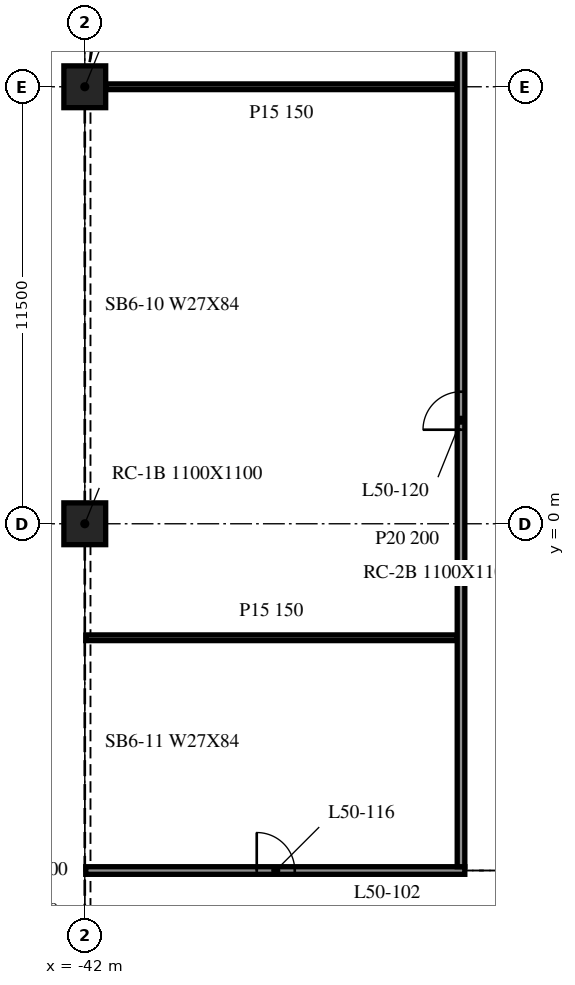
"""IFC4 building model, lengths in metres.
Left out: names, types, materials, properties, quantities, classifications, styles, units other than length and angle.
Written with IfcOpenShell. Run it as: python <this file> out.ifc"""

import sys

from ifc_helpers import new_model, si_unit, direction, frame, frame_2d, origin, origin_2d, place, context, subcontext, project, spatial, rectangle, extrude, element, fill, save


model = new_model("IFC4")
c1 = context("Model", 3, precision=1e-05, world=origin(), true_north=direction((0.0, 1.0)))
c2 = subcontext(c1, "Body", "Model", "MODEL_VIEW")
j1 = project(units=[si_unit("LENGTHUNIT", "METRE"), si_unit("PLANEANGLEUNIT", "RADIAN")], contexts=[c1])
p1 = place(None, origin())
s1 = spatial("IfcSite", under=j1, at=p1, CompositionType="ELEMENT")
p2 = place(p1, origin())
s2 = spatial("IfcBuilding", under=s1, at=p2, CompositionType="ELEMENT")
p3 = place(p2, frame((0.0, 0.0, 209.1)))
s3 = spatial("IfcBuildingStorey", under=s2, at=p3, CompositionType="ELEMENT", Elevation=209.1)
for number, where, z_axis, x_axis in (
    (1, (-42.0, 0.0, -0.34), (0.0, 0.0, 1.0), (1.0, 0.0, 0.0)),
    (2, (-42.0, 11.5, -0.34), (0.0, 0.0, 1.0), (1.0, 0.0, 0.0)),
):
    element("IfcColumn", number, at=place(p3, frame(where, z_axis=z_axis, x_axis=x_axis)), inside=s3, PredefinedType="COLUMN", context=c2, shape_type="SweptSolid", body=[
        extrude(rectangle(XDim=1.1, YDim=1.1, at=origin_2d()), origin(), (0.0, 0.0, 1.0), 3.8),
    ])
p4 = place(p3, frame((-41.975, -9.125, 0.0), z_axis=(0.0, 0.0, 1.0), x_axis=(1.0, 0.0, 0.0)))
e3 = element("IfcWall", 3, at=p4, inside=s3, PredefinedType="PARTITIONING", context=c2, shape_type="SweptSolid", body=[
    extrude(rectangle(XDim=9.975, YDim=0.2, at=frame_2d((4.988, 0.0))), origin(), (0.0, 0.0, 1.0), 3.46),
])
p5 = place(p4, frame((4.5, 0.0, 0.0)))
e4 = element("IfcOpeningElement", 4, at=p5, cuts=e3, PredefinedType="OPENING", context=c2, shape_type="SweptSolid", body=[
    extrude(rectangle(XDim=1.0, YDim=2.1, at=frame_2d((0.5, 1.05))), frame((0.0, 0.11, 0.0), z_axis=(0.0, -1.0, 0.0), x_axis=(1.0, 0.0, 0.0)), (0.0, 0.0, 1.0), 0.22),
])
p6 = place(p3, frame((-41.975, -3.0, 0.0), z_axis=(0.0, 0.0, 1.0), x_axis=(1.0, 0.0, 0.0)))
e5 = element("IfcWall", 5, at=p6, inside=s3, PredefinedType="PARTITIONING", context=c2, shape_type="SweptSolid", body=[
    extrude(rectangle(XDim=9.775, YDim=0.15, at=frame_2d((4.888, 0.0))), origin(), (0.0, 0.0, 1.0), 3.46),
])
p7 = place(p3, frame((-41.45, 11.5, 0.0), z_axis=(0.0, 0.0, 1.0), x_axis=(1.0, 0.0, 0.0)))
e6 = element("IfcWall", 6, at=p7, inside=s3, PredefinedType="PARTITIONING", context=c2, shape_type="SweptSolid", body=[
    extrude(rectangle(XDim=9.25, YDim=0.15, at=frame_2d((4.625, 0.0))), origin(), (0.0, 0.0, 1.0), 3.46),
])
p8 = place(p3, frame((-32.1, -9.025, 0.0), z_axis=(0.0, 0.0, 1.0), x_axis=(0.0, 1.0, 0.0)))
e7 = element("IfcWall", 7, at=p8, inside=s3, PredefinedType="PARTITIONING", context=c2, shape_type="SweptSolid", body=[
    extrude(rectangle(XDim=24.05, YDim=0.2, at=frame_2d((12.025, 0.0))), origin(), (0.0, 0.0, 1.0), 3.46),
])
p9 = place(p8, frame((11.5, 0.0, 0.0)))
e8 = element("IfcOpeningElement", 8, at=p9, cuts=e7, PredefinedType="OPENING", context=c2, shape_type="SweptSolid", body=[
    extrude(rectangle(XDim=1.0, YDim=2.1, at=frame_2d((0.5, 1.05))), frame((0.0, 0.11, 0.0), z_axis=(0.0, -1.0, 0.0), x_axis=(1.0, 0.0, 0.0)), (0.0, 0.0, 1.0), 0.22),
])
p10 = place(p5, origin())
e9 = element("IfcDoor", 9, at=p10, inside=s3, OperationType="SINGLE_SWING_RIGHT", PredefinedType="DOOR", context=c2, shape_type="SweptSolid", body=[
    extrude(rectangle(XDim=1.0, YDim=2.1, at=frame_2d((0.5, 1.05))), frame((0.0, 0.025, 0.0), z_axis=(0.0, -1.0, 0.0), x_axis=(1.0, 0.0, 0.0)), (0.0, 0.0, 1.0), 0.05),
])
fill(e4, e9)
p11 = place(p9, origin())
e10 = element("IfcDoor", 10, at=p11, inside=s3, OperationType="SINGLE_SWING_LEFT", PredefinedType="DOOR", context=c2, shape_type="SweptSolid", body=[
    extrude(rectangle(XDim=1.0, YDim=2.1, at=frame_2d((0.5, 1.05))), frame((0.0, 0.025, 0.0), z_axis=(0.0, -1.0, 0.0), x_axis=(1.0, 0.0, 0.0)), (0.0, 0.0, 1.0), 0.05),
])
fill(e8, e10)
save(model, sys.argv[1])
